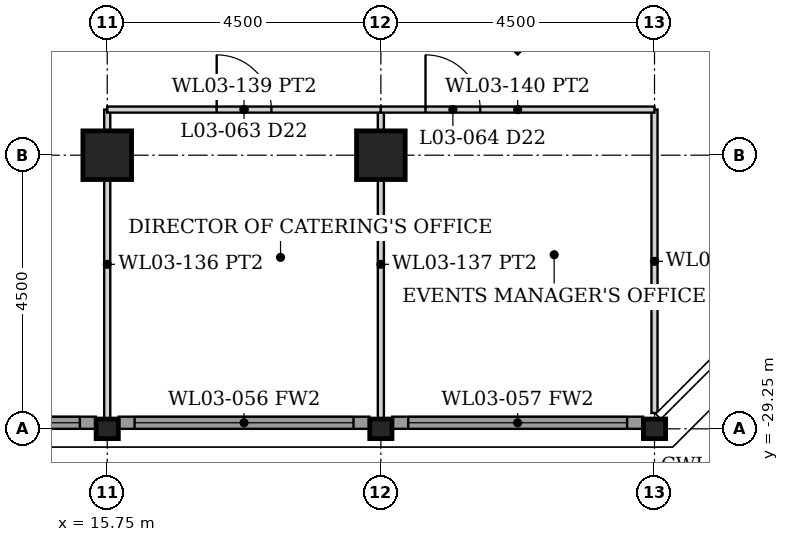
"""IFC4 building model, lengths in metres.
Left out: names, types, materials, properties, quantities, classifications, styles, units other than length and angle.
Written with IfcOpenShell. Run it as: python <this file> out.ifc"""

import sys

from ifc_helpers import new_model, si_unit, direction, frame, frame_2d, origin, origin_2d, place, context, subcontext, project, spatial, rectangle, hollow_rectangle, i_section, extrude, element, fill, save


model = new_model("IFC4")
c1 = context("Model", 3, precision=1e-05, world=origin(), true_north=direction((0.0, 1.0)))
c2 = subcontext(c1, "Body", "Model", "MODEL_VIEW")
j1 = project(units=[si_unit("LENGTHUNIT", "METRE"), si_unit("PLANEANGLEUNIT", "RADIAN")], contexts=[c1])
p1 = place(None, origin())
s1 = spatial("IfcSite", under=j1, at=p1, CompositionType="ELEMENT")
p2 = place(p1, origin())
s2 = spatial("IfcBuilding", under=s1, at=p2, CompositionType="ELEMENT")
p3 = place(p2, frame((0.0, 0.0, 16.0)))
s3 = spatial("IfcBuildingStorey", under=s2, at=p3, CompositionType="ELEMENT", Elevation=16.0)
for number, where, z_axis, x_axis in (
    (1, (15.75, -24.75, 0.0), (0.0, 0.0, 1.0), (0.0, 1.0, 0.0)),
    (2, (20.25, -24.75, 0.0), (0.0, 0.0, 1.0), (0.0, 1.0, 0.0)),
    (3, (22.5, -22.5, 0.0), (0.0, 0.0, 1.0), (0.707, -0.707, 0.0)),
):
    element("IfcColumn", number, at=place(p3, frame(where, z_axis=z_axis, x_axis=x_axis)), inside=s3, PredefinedType="COLUMN", context=c2, shape_type="SweptSolid", body=[
        extrude(hollow_rectangle(XDim=0.8, YDim=0.8, WallThickness=0.08, at=origin_2d()), origin(), (0.0, 0.0, 1.0), 5.5),
    ])
for number, where, z_axis, x_axis in (
    (4, (15.75, -29.25, 0.0), (0.0, 0.0, 1.0), (0.0, 1.0, 0.0)),
    (5, (20.25, -29.25, 0.0), (0.0, 0.0, 1.0), (0.0, 1.0, 0.0)),
    (6, (24.75, -29.25, 0.0), (0.0, 0.0, 1.0), (0.0, 1.0, 0.0)),
):
    element("IfcColumn", number, at=place(p3, frame(where, z_axis=z_axis, x_axis=x_axis)), inside=s3, PredefinedType="COLUMN", context=c2, shape_type="SweptSolid", body=[
        extrude(i_section(OverallWidth=0.322, OverallDepth=0.365, WebThickness=0.027, FlangeThickness=0.044, FilletRadius=0.015, at=origin_2d()), origin(), (0.0, 0.0, 1.0), 5.5),
    ])
p4 = place(p3, frame((11.438, -29.15, 0.0), z_axis=(0.0, 0.0, 1.0), x_axis=(1.0, 0.0, 0.0)))
e7 = element("IfcWall", 7, at=p4, inside=s3, PredefinedType="SOLIDWALL", context=c2, shape_type="SweptSolid", body=[
    extrude(rectangle(XDim=4.125, YDim=0.2, at=frame_2d((2.062, 0.0))), origin(), (0.0, 0.0, 1.0), 4.633),
])
p5 = place(p4, frame((0.262, 0.0, 0.15)))
e8 = element("IfcOpeningElement", 8, at=p5, cuts=e7, PredefinedType="OPENING", context=c2, shape_type="SweptSolid", body=[
    extrude(rectangle(XDim=3.6, YDim=4.333, at=frame_2d((1.8, 2.167))), frame((0.0, 0.11, 0.0), z_axis=(0.0, -1.0, 0.0), x_axis=(1.0, 0.0, 0.0)), (0.0, 0.0, 1.0), 0.22),
])
p6 = place(p3, frame((15.938, -29.15, 0.0), z_axis=(0.0, 0.0, 1.0), x_axis=(1.0, 0.0, 0.0)))
e9 = element("IfcWall", 9, at=p6, inside=s3, PredefinedType="SOLIDWALL", context=c2, shape_type="SweptSolid", body=[
    extrude(rectangle(XDim=4.125, YDim=0.2, at=frame_2d((2.062, 0.0))), origin(), (0.0, 0.0, 1.0), 4.633),
])
p7 = place(p6, frame((0.262, 0.0, 0.15)))
e10 = element("IfcOpeningElement", 10, at=p7, cuts=e9, PredefinedType="OPENING", context=c2, shape_type="SweptSolid", body=[
    extrude(rectangle(XDim=3.6, YDim=4.333, at=frame_2d((1.8, 2.167))), frame((0.0, 0.11, 0.0), z_axis=(0.0, -1.0, 0.0), x_axis=(1.0, 0.0, 0.0)), (0.0, 0.0, 1.0), 0.22),
])
p8 = place(p3, frame((20.438, -29.15, 0.0), z_axis=(0.0, 0.0, 1.0), x_axis=(1.0, 0.0, 0.0)))
e11 = element("IfcWall", 11, at=p8, inside=s3, PredefinedType="SOLIDWALL", context=c2, shape_type="SweptSolid", body=[
    extrude(rectangle(XDim=4.125, YDim=0.2, at=frame_2d((2.062, 0.0))), origin(), (0.0, 0.0, 1.0), 4.633),
])
p9 = place(p8, frame((0.262, 0.0, 0.15)))
e12 = element("IfcOpeningElement", 12, at=p9, cuts=e11, PredefinedType="OPENING", context=c2, shape_type="SweptSolid", body=[
    extrude(rectangle(XDim=3.6, YDim=4.333, at=frame_2d((1.8, 2.167))), frame((0.0, 0.11, 0.0), z_axis=(0.0, -1.0, 0.0), x_axis=(1.0, 0.0, 0.0)), (0.0, 0.0, 1.0), 0.22),
])
for number, where, z_axis, x_axis in (
    (13, (15.75, -29.089, 0.0), (0.0, 0.0, 1.0), (0.0, 1.0, 0.0)),
    (14, (20.25, -29.089, 0.0), (0.0, 0.0, 1.0), (0.0, 1.0, 0.0)),
):
    element("IfcWall", number, at=place(p3, frame(where, z_axis=z_axis, x_axis=x_axis)), inside=s3, PredefinedType="PARTITIONING", context=c2, shape_type="SweptSolid", body=[
        extrude(rectangle(XDim=5.089, YDim=0.1, at=frame_2d((2.544, 0.0))), origin(), (0.0, 0.0, 1.0), 4.329),
    ])
p10 = place(p3, frame((15.75, -24.0, 0.0), z_axis=(0.0, 0.0, 1.0), x_axis=(1.0, 0.0, 0.0)))
e15 = element("IfcWall", 15, at=p10, inside=s3, PredefinedType="PARTITIONING", context=c2, shape_type="SweptSolid", body=[
    extrude(rectangle(XDim=4.5, YDim=0.1, at=frame_2d((2.25, 0.0))), origin(), (0.0, 0.0, 1.0), 4.329),
])
p11 = place(p10, frame((1.8, 0.0, 0.0)))
e16 = element("IfcOpeningElement", 16, at=p11, cuts=e15, PredefinedType="OPENING", context=c2, shape_type="SweptSolid", body=[
    extrude(rectangle(XDim=0.9, YDim=2.1, at=frame_2d((0.45, 1.05))), frame((0.0, 0.06, 0.0), z_axis=(0.0, -1.0, 0.0), x_axis=(1.0, 0.0, 0.0)), (0.0, 0.0, 1.0), 0.12),
])
p12 = place(p3, frame((24.75, -28.99, 0.0), z_axis=(0.0, 0.0, 1.0), x_axis=(0.0, 1.0, 0.0)))
e17 = element("IfcWall", 17, at=p12, inside=s3, PredefinedType="PARTITIONING", context=c2, shape_type="SweptSolid", body=[
    extrude(rectangle(XDim=4.99, YDim=0.1, at=frame_2d((2.495, 0.0))), origin(), (0.0, 0.0, 1.0), 4.329),
])
p13 = place(p3, frame((20.25, -24.0, 0.0), z_axis=(0.0, 0.0, 1.0), x_axis=(1.0, 0.0, 0.0)))
e18 = element("IfcWall", 18, at=p13, inside=s3, PredefinedType="PARTITIONING", context=c2, shape_type="SweptSolid", body=[
    extrude(rectangle(XDim=4.5, YDim=0.1, at=frame_2d((2.25, 0.0))), origin(), (0.0, 0.0, 1.0), 4.329),
])
p14 = place(p13, frame((0.734, 0.0, 0.0)))
e19 = element("IfcOpeningElement", 19, at=p14, cuts=e18, PredefinedType="OPENING", context=c2, shape_type="SweptSolid", body=[
    extrude(rectangle(XDim=0.9, YDim=2.1, at=frame_2d((0.45, 1.05))), frame((0.0, 0.06, 0.0), z_axis=(0.0, -1.0, 0.0), x_axis=(1.0, 0.0, 0.0)), (0.0, 0.0, 1.0), 0.12),
])
p15 = place(p5, origin())
e20 = element("IfcWindow", 20, at=p15, inside=s3, PartitioningType="SINGLE_PANEL", PredefinedType="WINDOW", context=c2, shape_type="SweptSolid", body=[
    extrude(rectangle(XDim=3.6, YDim=4.333, at=frame_2d((1.8, 2.167))), frame((0.0, 0.03, 0.0), z_axis=(0.0, -1.0, 0.0), x_axis=(1.0, 0.0, 0.0)), (0.0, 0.0, 1.0), 0.06),
])
fill(e8, e20)
p16 = place(p7, origin())
e21 = element("IfcWindow", 21, at=p16, inside=s3, PartitioningType="SINGLE_PANEL", PredefinedType="WINDOW", context=c2, shape_type="SweptSolid", body=[
    extrude(rectangle(XDim=3.6, YDim=4.333, at=frame_2d((1.8, 2.167))), frame((0.0, 0.03, 0.0), z_axis=(0.0, -1.0, 0.0), x_axis=(1.0, 0.0, 0.0)), (0.0, 0.0, 1.0), 0.06),
])
fill(e10, e21)
p17 = place(p9, origin())
e22 = element("IfcWindow", 22, at=p17, inside=s3, PartitioningType="SINGLE_PANEL", PredefinedType="WINDOW", context=c2, shape_type="SweptSolid", body=[
    extrude(rectangle(XDim=3.6, YDim=4.333, at=frame_2d((1.8, 2.167))), frame((0.0, 0.03, 0.0), z_axis=(0.0, -1.0, 0.0), x_axis=(1.0, 0.0, 0.0)), (0.0, 0.0, 1.0), 0.06),
])
fill(e12, e22)
p18 = place(p11, origin())
e23 = element("IfcDoor", 23, at=p18, inside=s3, OperationType="SINGLE_SWING_LEFT", PredefinedType="DOOR", context=c2, shape_type="SweptSolid", body=[
    extrude(rectangle(XDim=0.9, YDim=2.1, at=frame_2d((0.45, 1.05))), frame((0.0, 0.025, 0.0), z_axis=(0.0, -1.0, 0.0), x_axis=(1.0, 0.0, 0.0)), (0.0, 0.0, 1.0), 0.05),
])
fill(e16, e23)
p19 = place(p14, origin())
e24 = element("IfcDoor", 24, at=p19, inside=s3, OperationType="SINGLE_SWING_LEFT", PredefinedType="DOOR", context=c2, shape_type="SweptSolid", body=[
    extrude(rectangle(XDim=0.9, YDim=2.1, at=frame_2d((0.45, 1.05))), frame((0.0, 0.025, 0.0), z_axis=(0.0, -1.0, 0.0), x_axis=(1.0, 0.0, 0.0)), (0.0, 0.0, 1.0), 0.05),
])
fill(e19, e24)
save(model, sys.argv[1])
